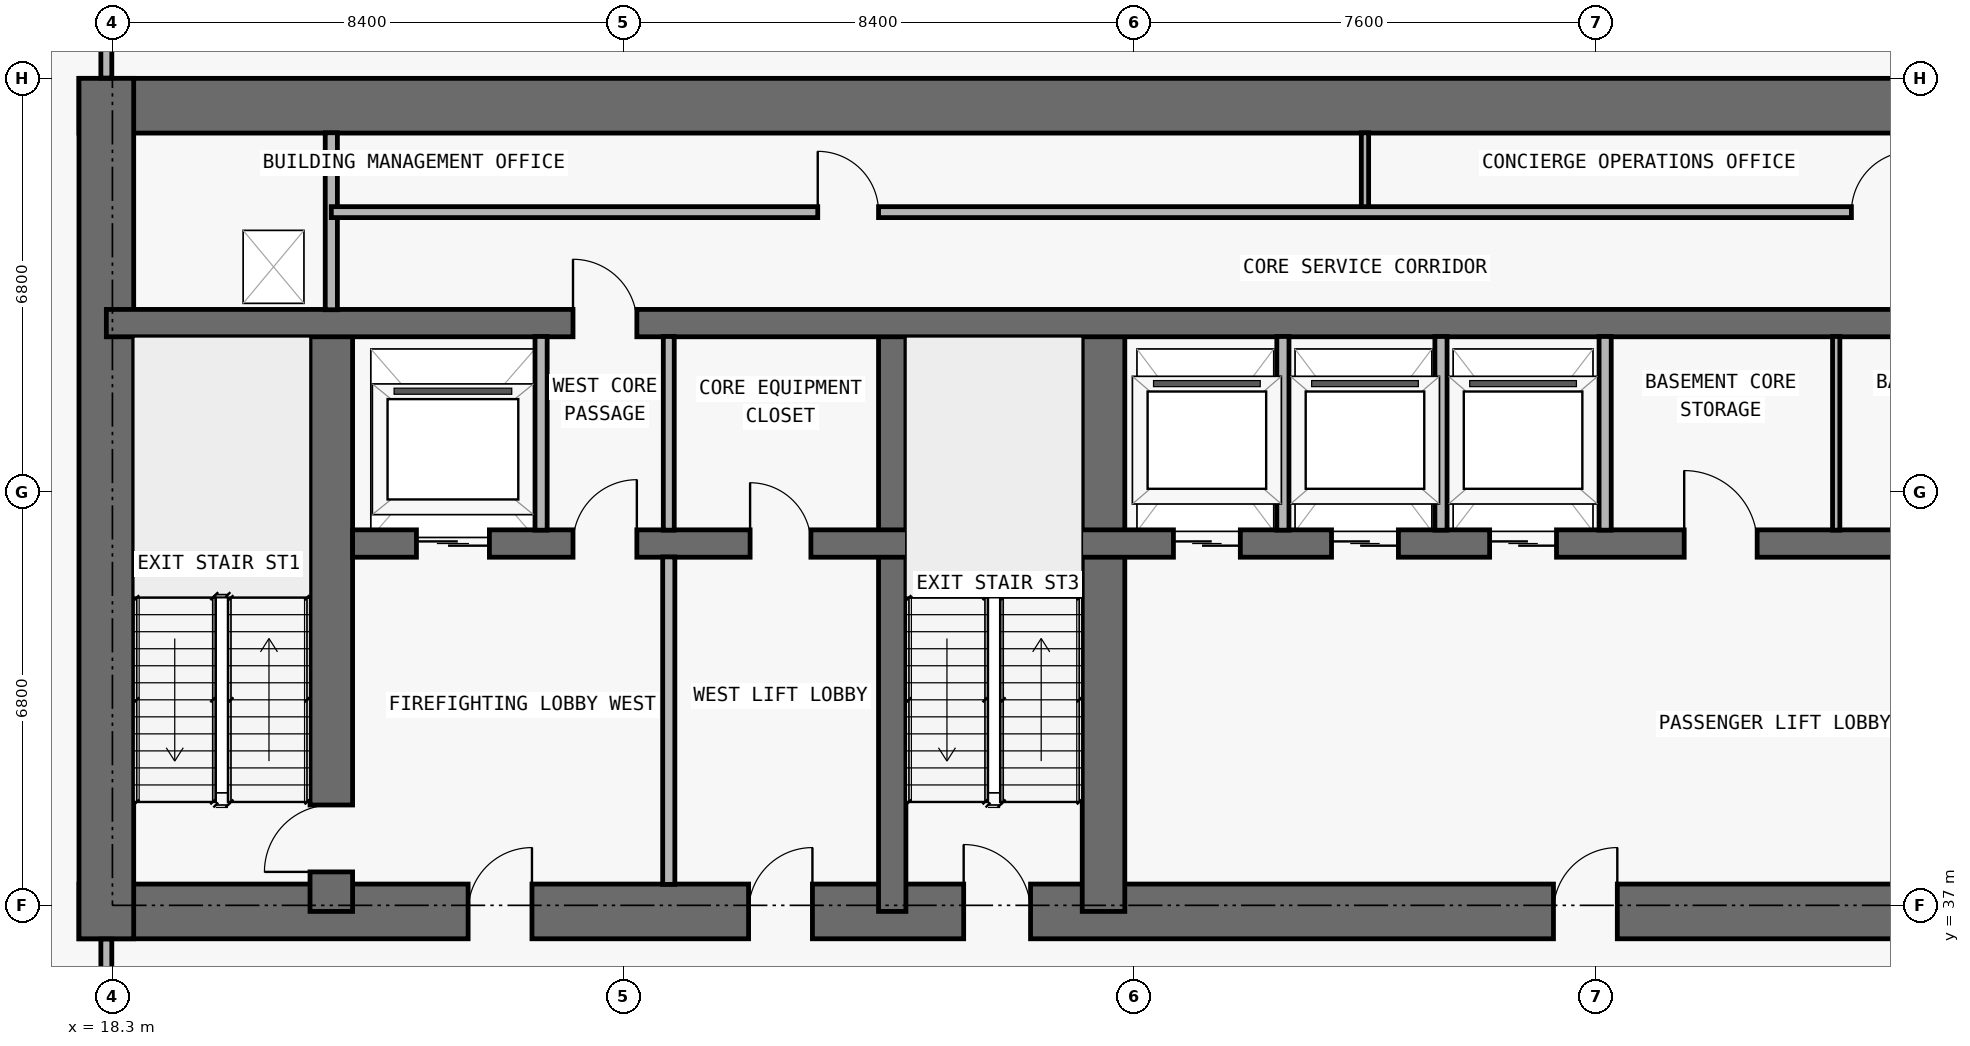
"""IFC4 building model, lengths in metres.
Left out: names, types, materials, properties, quantities, classifications, styles, units other than length and angle.
Written with IfcOpenShell. Run it as: python <this file> out.ifc"""

import sys

from ifc_helpers import new_model, si_unit, direction, frame, frame_2d, origin, place, context, subcontext, project, spatial, rectangle, extrude, element, fill, save


model = new_model("IFC4")
c1 = context("Model", 3, precision=1e-05, world=origin(), true_north=direction((0.0, 1.0)))
c2 = subcontext(c1, "Body", "Model", "MODEL_VIEW")
j1 = project(units=[si_unit("LENGTHUNIT", "METRE"), si_unit("PLANEANGLEUNIT", "RADIAN")], contexts=[c1])
p1 = place(None, origin())
s1 = spatial("IfcSite", under=j1, at=p1, CompositionType="ELEMENT")
p2 = place(p1, origin())
s2 = spatial("IfcBuilding", under=s1, at=p2, CompositionType="ELEMENT")
p3 = place(p2, frame((0.0, 0.0, -4.5)))
s3 = spatial("IfcBuildingStorey", under=s2, at=p3, CompositionType="ELEMENT", Elevation=-4.5)
p4 = place(p3, frame((17.75, 36.9, 0.0), z_axis=(0.0, 0.0, 1.0), x_axis=(1.0, 0.0, 0.0)))
e1 = element("IfcWall", 1, at=p4, inside=s3, PredefinedType="SHEAR", context=c2, shape_type="SweptSolid", body=[
    extrude(rectangle(XDim=42.3, YDim=0.9, at=frame_2d((21.15, 0.0))), origin(), (0.0, 0.0, 1.0), 4.2),
])
p5 = place(p4, frame((14.55, 0.0, 0.0)))
e2 = element("IfcOpeningElement", 2, at=p5, cuts=e1, PredefinedType="OPENING", context=c2, shape_type="SweptSolid", body=[
    extrude(rectangle(XDim=1.1, YDim=2.15, at=frame_2d((0.55, 1.075))), frame((0.0, 0.46, 0.0), z_axis=(0.0, -1.0, 0.0), x_axis=(1.0, 0.0, 0.0)), (0.0, 0.0, 1.0), 0.92),
])
p6 = place(p4, frame((6.4, 0.0, 0.0)))
e3 = element("IfcOpeningElement", 3, at=p6, cuts=e1, PredefinedType="OPENING", context=c2, shape_type="SweptSolid", body=[
    extrude(rectangle(XDim=1.05, YDim=2.15, at=frame_2d((0.525, 1.075))), frame((0.0, 0.46, 0.0), z_axis=(0.0, -1.0, 0.0), x_axis=(1.0, 0.0, 0.0)), (0.0, 0.0, 1.0), 0.92),
])
p7 = place(p4, frame((34.9, 0.0, 0.0)))
e4 = element("IfcOpeningElement", 4, at=p7, cuts=e1, PredefinedType="OPENING", context=c2, shape_type="SweptSolid", body=[
    extrude(rectangle(XDim=1.05, YDim=2.15, at=frame_2d((0.525, 1.075))), frame((0.0, 0.46, 0.0), z_axis=(0.0, -1.0, 0.0), x_axis=(1.0, 0.0, 0.0)), (0.0, 0.0, 1.0), 0.92),
])
p8 = place(p4, frame((11.012, 0.0, 0.0)))
e5 = element("IfcOpeningElement", 5, at=p8, cuts=e1, PredefinedType="OPENING", context=c2, shape_type="SweptSolid", body=[
    extrude(rectangle(XDim=1.05, YDim=2.15, at=frame_2d((0.525, 1.075))), frame((0.0, 0.46, 0.0), z_axis=(0.0, -1.0, 0.0), x_axis=(1.0, 0.0, 0.0)), (0.0, 0.0, 1.0), 0.92),
])
p9 = place(p4, frame((24.25, 0.0, 0.0)))
e6 = element("IfcOpeningElement", 6, at=p9, cuts=e1, PredefinedType="OPENING", context=c2, shape_type="SweptSolid", body=[
    extrude(rectangle(XDim=1.05, YDim=2.15, at=frame_2d((0.525, 1.075))), frame((0.0, 0.46, 0.0), z_axis=(0.0, -1.0, 0.0), x_axis=(1.0, 0.0, 0.0)), (0.0, 0.0, 1.0), 0.92),
])
p10 = place(p3, frame((17.75, 50.15, 0.0), z_axis=(0.0, 0.0, 1.0), x_axis=(1.0, 0.0, 0.0)))
e7 = element("IfcWall", 7, at=p10, inside=s3, PredefinedType="SHEAR", context=c2, shape_type="SweptSolid", body=[
    extrude(rectangle(XDim=42.3, YDim=0.9, at=frame_2d((21.15, 0.0))), origin(), (0.0, 0.0, 1.0), 4.2),
])
p11 = place(p3, frame((18.2, 36.45, 0.0), z_axis=(0.0, 0.0, 1.0), x_axis=(0.0, 1.0, 0.0)))
e8 = element("IfcWall", 8, at=p11, inside=s3, PredefinedType="SHEAR", context=c2, shape_type="SweptSolid", body=[
    extrude(rectangle(XDim=14.15, YDim=0.9, at=frame_2d((7.075, 0.0))), origin(), (0.0, 0.0, 1.0), 4.2),
])
p12 = place(p3, frame((21.9, 36.9, 0.0), z_axis=(0.0, 0.0, 1.0), x_axis=(0.0, 1.0, 0.0)))
e9 = element("IfcWall", 9, at=p12, inside=s3, PredefinedType="SHEAR", context=c2, shape_type="SweptSolid", body=[
    extrude(rectangle(XDim=9.675, YDim=0.7, at=frame_2d((4.837, 0.0))), origin(), (0.0, 0.0, 1.0), 4.2),
])
p13 = place(p12, frame((0.65, 0.0, 0.0)))
e10 = element("IfcOpeningElement", 10, at=p13, cuts=e9, PredefinedType="OPENING", context=c2, shape_type="SweptSolid", body=[
    extrude(rectangle(XDim=1.1, YDim=2.15, at=frame_2d((0.55, 1.075))), frame((0.0, 0.36, 0.0), z_axis=(0.0, -1.0, 0.0), x_axis=(1.0, 0.0, 0.0)), (0.0, 0.0, 1.0), 0.72),
])
p14 = place(p3, frame((31.125, 36.9, 0.0), z_axis=(0.0, 0.0, 1.0), x_axis=(0.0, 1.0, 0.0)))
e11 = element("IfcWall", 11, at=p14, inside=s3, PredefinedType="SHEAR", context=c2, shape_type="SweptSolid", body=[
    extrude(rectangle(XDim=9.675, YDim=0.45, at=frame_2d((4.837, 0.0))), origin(), (0.0, 0.0, 1.0), 4.2),
])
p15 = place(p3, frame((34.6, 36.9, 0.0), z_axis=(0.0, 0.0, 1.0), x_axis=(0.0, 1.0, 0.0)))
e12 = element("IfcWall", 12, at=p15, inside=s3, PredefinedType="SHEAR", context=c2, shape_type="SweptSolid", body=[
    extrude(rectangle(XDim=9.675, YDim=0.7, at=frame_2d((4.837, 0.0))), origin(), (0.0, 0.0, 1.0), 4.2),
])
p16 = place(p3, frame((22.25, 42.95, 0.0), z_axis=(0.0, 0.0, 1.0), x_axis=(1.0, 0.0, 0.0)))
e13 = element("IfcWall", 13, at=p16, inside=s3, PredefinedType="SHEAR", context=c2, shape_type="SweptSolid", body=[
    extrude(rectangle(XDim=33.3, YDim=0.45, at=frame_2d((16.65, 0.0))), origin(), (0.0, 0.0, 1.0), 4.2),
])
p17 = place(p16, frame((1.05, 0.0, 0.0)))
e14 = element("IfcOpeningElement", 14, at=p17, cuts=e13, PredefinedType="OPENING", context=c2, shape_type="SweptSolid", body=[
    extrude(rectangle(XDim=1.2, YDim=2.2, at=frame_2d((0.6, 1.1))), frame((0.0, 0.235, 0.0), z_axis=(0.0, -1.0, 0.0), x_axis=(1.0, 0.0, 0.0)), (0.0, 0.0, 1.0), 0.47),
])
p18 = place(p16, frame((31.05, 0.0, 0.0)))
e15 = element("IfcOpeningElement", 15, at=p18, cuts=e13, PredefinedType="OPENING", context=c2, shape_type="SweptSolid", body=[
    extrude(rectangle(XDim=1.2, YDim=2.2, at=frame_2d((0.6, 1.1))), frame((0.0, 0.235, 0.0), z_axis=(0.0, -1.0, 0.0), x_axis=(1.0, 0.0, 0.0)), (0.0, 0.0, 1.0), 0.47),
])
p19 = place(p16, frame((13.5, 0.0, 0.0)))
e16 = element("IfcOpeningElement", 16, at=p19, cuts=e13, PredefinedType="OPENING", context=c2, shape_type="SweptSolid", body=[
    extrude(rectangle(XDim=1.1, YDim=2.2, at=frame_2d((0.55, 1.1))), frame((0.0, 0.235, 0.0), z_axis=(0.0, -1.0, 0.0), x_axis=(1.0, 0.0, 0.0)), (0.0, 0.0, 1.0), 0.47),
])
p20 = place(p16, frame((16.1, 0.0, 0.0)))
e17 = element("IfcOpeningElement", 17, at=p20, cuts=e13, PredefinedType="OPENING", context=c2, shape_type="SweptSolid", body=[
    extrude(rectangle(XDim=1.1, YDim=2.2, at=frame_2d((0.55, 1.1))), frame((0.0, 0.235, 0.0), z_axis=(0.0, -1.0, 0.0), x_axis=(1.0, 0.0, 0.0)), (0.0, 0.0, 1.0), 0.47),
])
p21 = place(p16, frame((18.7, 0.0, 0.0)))
e18 = element("IfcOpeningElement", 18, at=p21, cuts=e13, PredefinedType="OPENING", context=c2, shape_type="SweptSolid", body=[
    extrude(rectangle(XDim=1.1, YDim=2.2, at=frame_2d((0.55, 1.1))), frame((0.0, 0.235, 0.0), z_axis=(0.0, -1.0, 0.0), x_axis=(1.0, 0.0, 0.0)), (0.0, 0.0, 1.0), 0.47),
])
p22 = place(p16, frame((3.625, 0.0, 0.0)))
e19 = element("IfcOpeningElement", 19, at=p22, cuts=e13, PredefinedType="OPENING", context=c2, shape_type="SweptSolid", body=[
    extrude(rectangle(XDim=1.05, YDim=2.15, at=frame_2d((0.525, 1.075))), frame((0.0, 0.235, 0.0), z_axis=(0.0, -1.0, 0.0), x_axis=(1.0, 0.0, 0.0)), (0.0, 0.0, 1.0), 0.47),
])
p23 = place(p16, frame((28.675, 0.0, 0.0)))
e20 = element("IfcOpeningElement", 20, at=p23, cuts=e13, PredefinedType="OPENING", context=c2, shape_type="SweptSolid", body=[
    extrude(rectangle(XDim=1.05, YDim=2.15, at=frame_2d((0.525, 1.075))), frame((0.0, 0.235, 0.0), z_axis=(0.0, -1.0, 0.0), x_axis=(1.0, 0.0, 0.0)), (0.0, 0.0, 1.0), 0.47),
])
p24 = place(p16, frame((6.538, 0.0, 0.0)))
e21 = element("IfcOpeningElement", 21, at=p24, cuts=e13, PredefinedType="OPENING", context=c2, shape_type="SweptSolid", body=[
    extrude(rectangle(XDim=1.0, YDim=2.2, at=frame_2d((0.5, 1.1))), frame((0.0, 0.235, 0.0), z_axis=(0.0, -1.0, 0.0), x_axis=(1.0, 0.0, 0.0)), (0.0, 0.0, 1.0), 0.47),
])
p25 = place(p16, frame((21.9, 0.0, 0.0)))
e22 = element("IfcOpeningElement", 22, at=p25, cuts=e13, PredefinedType="OPENING", context=c2, shape_type="SweptSolid", body=[
    extrude(rectangle(XDim=1.2, YDim=2.2, at=frame_2d((0.6, 1.1))), frame((0.0, 0.235, 0.0), z_axis=(0.0, -1.0, 0.0), x_axis=(1.0, 0.0, 0.0)), (0.0, 0.0, 1.0), 0.47),
])
p26 = place(p16, frame((25.7, 0.0, 0.0)))
e23 = element("IfcOpeningElement", 23, at=p26, cuts=e13, PredefinedType="OPENING", context=c2, shape_type="SweptSolid", body=[
    extrude(rectangle(XDim=1.2, YDim=2.2, at=frame_2d((0.6, 1.1))), frame((0.0, 0.235, 0.0), z_axis=(0.0, -1.0, 0.0), x_axis=(1.0, 0.0, 0.0)), (0.0, 0.0, 1.0), 0.47),
])
p27 = place(p3, frame((18.2, 46.575, 0.0), z_axis=(0.0, 0.0, 1.0), x_axis=(1.0, 0.0, 0.0)))
e24 = element("IfcWall", 24, at=p27, inside=s3, PredefinedType="SHEAR", context=c2, shape_type="SweptSolid", body=[
    extrude(rectangle(XDim=41.4, YDim=0.45, at=frame_2d((20.7, 0.0))), origin(), (0.0, 0.0, 1.0), 4.2),
])
p28 = place(p27, frame((7.675, 0.0, 0.0)))
e25 = element("IfcOpeningElement", 25, at=p28, cuts=e24, PredefinedType="OPENING", context=c2, shape_type="SweptSolid", body=[
    extrude(rectangle(XDim=1.05, YDim=2.15, at=frame_2d((0.525, 1.075))), frame((0.0, 0.235, 0.0), z_axis=(0.0, -1.0, 0.0), x_axis=(1.0, 0.0, 0.0)), (0.0, 0.0, 1.0), 0.47),
])
p29 = place(p27, frame((32.725, 0.0, 0.0)))
e26 = element("IfcOpeningElement", 26, at=p29, cuts=e24, PredefinedType="OPENING", context=c2, shape_type="SweptSolid", body=[
    extrude(rectangle(XDim=1.05, YDim=2.15, at=frame_2d((0.525, 1.075))), frame((0.0, 0.235, 0.0), z_axis=(0.0, -1.0, 0.0), x_axis=(1.0, 0.0, 0.0)), (0.0, 0.0, 1.0), 0.47),
])
p30 = place(p3, frame((18.2, 34.4, 0.0), z_axis=(0.0, 0.0, 1.0), x_axis=(0.0, 1.0, 0.0)))
e27 = element("IfcWall", 27, at=p30, inside=s3, PredefinedType="PARTITIONING", context=c2, shape_type="SweptSolid", body=[
    extrude(rectangle(XDim=2.045, YDim=0.18, at=frame_2d((1.022, 0.0))), origin(), (0.0, 0.0, 1.0), 3.085),
])
p31 = place(p3, frame((18.2, 50.605, 0.0), z_axis=(0.0, 0.0, 1.0), x_axis=(0.0, 1.0, 0.0)))
e28 = element("IfcWall", 28, at=p31, inside=s3, PredefinedType="PARTITIONING", context=c2, shape_type="SweptSolid", body=[
    extrude(rectangle(XDim=2.695, YDim=0.18, at=frame_2d((1.348, 0.0))), origin(), (0.0, 0.0, 1.0), 4.2),
])
p32 = place(p3, frame((21.9, 46.795, 0.0), z_axis=(0.0, 0.0, 1.0), x_axis=(0.0, 1.0, 0.0)))
e29 = element("IfcWall", 29, at=p32, inside=s3, PredefinedType="PARTITIONING", context=c2, shape_type="SweptSolid", body=[
    extrude(rectangle(XDim=2.91, YDim=0.2, at=frame_2d((1.455, 0.0))), origin(), (0.0, 0.0, 1.0), 4.2),
])
p33 = place(p3, frame((25.35, 43.17, 0.0), z_axis=(0.0, 0.0, 1.0), x_axis=(0.0, 1.0, 0.0)))
e30 = element("IfcWall", 30, at=p33, inside=s3, PredefinedType="PARTITIONING", context=c2, shape_type="SweptSolid", body=[
    extrude(rectangle(XDim=3.185, YDim=0.2, at=frame_2d((1.593, 0.0))), origin(), (0.0, 0.0, 1.0), 4.2),
])
p34 = place(p3, frame((27.45, 37.345, 0.0), z_axis=(0.0, 0.0, 1.0), x_axis=(0.0, 1.0, 0.0)))
e31 = element("IfcWall", 31, at=p34, inside=s3, PredefinedType="PARTITIONING", context=c2, shape_type="SweptSolid", body=[
    extrude(rectangle(XDim=5.385, YDim=0.2, at=frame_2d((2.692, 0.0))), origin(), (0.0, 0.0, 1.0), 4.2),
])
p35 = place(p3, frame((27.45, 43.17, 0.0), z_axis=(0.0, 0.0, 1.0), x_axis=(0.0, 1.0, 0.0)))
e32 = element("IfcWall", 32, at=p35, inside=s3, PredefinedType="PARTITIONING", context=c2, shape_type="SweptSolid", body=[
    extrude(rectangle(XDim=3.185, YDim=0.18, at=frame_2d((1.593, 0.0))), origin(), (0.0, 0.0, 1.0), 4.2),
])
p36 = place(p3, frame((37.55, 43.17, 0.0), z_axis=(0.0, 0.0, 1.0), x_axis=(0.0, 1.0, 0.0)))
e33 = element("IfcWall", 33, at=p36, inside=s3, PredefinedType="PARTITIONING", context=c2, shape_type="SweptSolid", body=[
    extrude(rectangle(XDim=3.185, YDim=0.2, at=frame_2d((1.593, 0.0))), origin(), (0.0, 0.0, 1.0), 4.2),
])
p37 = place(p3, frame((38.9, 48.4, 0.0), z_axis=(0.0, 0.0, 1.0), x_axis=(0.0, 1.0, 0.0)))
e34 = element("IfcWall", 34, at=p37, inside=s3, PredefinedType="PARTITIONING", context=c2, shape_type="SweptSolid", body=[
    extrude(rectangle(XDim=1.305, YDim=0.12, at=frame_2d((0.653, 0.0))), origin(), (0.0, 0.0, 1.0), 4.2),
])
for number, where, z_axis, x_axis in (
    (35, (40.15, 43.17, 0.0), (0.0, 0.0, 1.0), (0.0, 1.0, 0.0)),
    (36, (42.85, 43.17, 0.0), (0.0, 0.0, 1.0), (0.0, 1.0, 0.0)),
):
    element("IfcWall", number, at=place(p3, frame(where, z_axis=z_axis, x_axis=x_axis)), inside=s3, PredefinedType="PARTITIONING", context=c2, shape_type="SweptSolid", body=[
        extrude(rectangle(XDim=3.185, YDim=0.2, at=frame_2d((1.593, 0.0))), origin(), (0.0, 0.0, 1.0), 4.2),
    ])
p38 = place(p3, frame((46.65, 43.17, 0.0), z_axis=(0.0, 0.0, 1.0), x_axis=(0.0, 1.0, 0.0)))
e37 = element("IfcWall", 37, at=p38, inside=s3, PredefinedType="PARTITIONING", context=c2, shape_type="SweptSolid", body=[
    extrude(rectangle(XDim=3.185, YDim=0.12, at=frame_2d((1.593, 0.0))), origin(), (0.0, 0.0, 1.0), 4.2),
])
p39 = place(p3, frame((21.9, 48.4, 0.0), z_axis=(0.0, 0.0, 1.0), x_axis=(1.0, 0.0, 0.0)))
e38 = element("IfcWall", 38, at=p39, inside=s3, PredefinedType="PARTITIONING", context=c2, shape_type="SweptSolid", body=[
    extrude(rectangle(XDim=34.0, YDim=0.18, at=frame_2d((17.0, 0.0))), origin(), (0.0, 0.0, 1.0), 4.2),
])
p40 = place(p39, frame((8.0, 0.0, 0.0)))
e39 = element("IfcOpeningElement", 39, at=p40, cuts=e38, PredefinedType="OPENING", context=c2, shape_type="SweptSolid", body=[
    extrude(rectangle(XDim=1.0, YDim=2.2, at=frame_2d((0.5, 1.1))), frame((0.0, 0.1, 0.0), z_axis=(0.0, -1.0, 0.0), x_axis=(1.0, 0.0, 0.0)), (0.0, 0.0, 1.0), 0.2),
])
p41 = place(p39, frame((25.0, 0.0, 0.0)))
e40 = element("IfcOpeningElement", 40, at=p41, cuts=e38, PredefinedType="OPENING", context=c2, shape_type="SweptSolid", body=[
    extrude(rectangle(XDim=1.0, YDim=2.2, at=frame_2d((0.5, 1.1))), frame((0.0, 0.1, 0.0), z_axis=(0.0, -1.0, 0.0), x_axis=(1.0, 0.0, 0.0)), (0.0, 0.0, 1.0), 0.2),
])
p42 = place(p17, origin())
e41 = element("IfcDoor", 41, at=p42, inside=s3, OperationType="DOUBLE_DOOR_SLIDING", PredefinedType="DOOR", context=c2, shape_type="SweptSolid", body=[
    extrude(rectangle(XDim=1.2, YDim=2.2, at=frame_2d((0.6, 1.1))), frame((0.0, 0.025, 0.0), z_axis=(0.0, -1.0, 0.0), x_axis=(1.0, 0.0, 0.0)), (0.0, 0.0, 1.0), 0.05),
])
fill(e14, e41)
p43 = place(p19, origin())
e42 = element("IfcDoor", 42, at=p43, inside=s3, OperationType="DOUBLE_DOOR_SLIDING", PredefinedType="DOOR", context=c2, shape_type="SweptSolid", body=[
    extrude(rectangle(XDim=1.1, YDim=2.2, at=frame_2d((0.55, 1.1))), frame((0.0, 0.025, 0.0), z_axis=(0.0, -1.0, 0.0), x_axis=(1.0, 0.0, 0.0)), (0.0, 0.0, 1.0), 0.05),
])
fill(e16, e42)
p44 = place(p20, origin())
e43 = element("IfcDoor", 43, at=p44, inside=s3, OperationType="DOUBLE_DOOR_SLIDING", PredefinedType="DOOR", context=c2, shape_type="SweptSolid", body=[
    extrude(rectangle(XDim=1.1, YDim=2.2, at=frame_2d((0.55, 1.1))), frame((0.0, 0.025, 0.0), z_axis=(0.0, -1.0, 0.0), x_axis=(1.0, 0.0, 0.0)), (0.0, 0.0, 1.0), 0.05),
])
fill(e17, e43)
p45 = place(p21, origin())
e44 = element("IfcDoor", 44, at=p45, inside=s3, OperationType="DOUBLE_DOOR_SLIDING", PredefinedType="DOOR", context=c2, shape_type="SweptSolid", body=[
    extrude(rectangle(XDim=1.1, YDim=2.2, at=frame_2d((0.55, 1.1))), frame((0.0, 0.025, 0.0), z_axis=(0.0, -1.0, 0.0), x_axis=(1.0, 0.0, 0.0)), (0.0, 0.0, 1.0), 0.05),
])
fill(e18, e44)
p46 = place(p5, origin())
e45 = element("IfcDoor", 45, at=p46, inside=s3, OperationType="SINGLE_SWING_LEFT", PredefinedType="DOOR", context=c2, shape_type="SweptSolid", body=[
    extrude(rectangle(XDim=1.1, YDim=2.15, at=frame_2d((0.55, 1.075))), frame((0.0, 0.025, 0.0), z_axis=(0.0, -1.0, 0.0), x_axis=(1.0, 0.0, 0.0)), (0.0, 0.0, 1.0), 0.05),
])
fill(e2, e45)
p47 = place(p6, origin())
e46 = element("IfcDoor", 46, at=p47, inside=s3, OperationType="SINGLE_SWING_RIGHT", PredefinedType="DOOR", context=c2, shape_type="SweptSolid", body=[
    extrude(rectangle(XDim=1.05, YDim=2.15, at=frame_2d((0.525, 1.075))), frame((0.0, 0.025, 0.0), z_axis=(0.0, -1.0, 0.0), x_axis=(1.0, 0.0, 0.0)), (0.0, 0.0, 1.0), 0.05),
])
fill(e3, e46)
p48 = place(p13, origin())
e47 = element("IfcDoor", 47, at=p48, inside=s3, OperationType="SINGLE_SWING_LEFT", PredefinedType="DOOR", context=c2, shape_type="SweptSolid", body=[
    extrude(rectangle(XDim=1.1, YDim=2.15, at=frame_2d((0.55, 1.075))), frame((0.0, 0.025, 0.0), z_axis=(0.0, -1.0, 0.0), x_axis=(1.0, 0.0, 0.0)), (0.0, 0.0, 1.0), 0.05),
])
fill(e10, e47)
p49 = place(p22, origin())
e48 = element("IfcDoor", 48, at=p49, inside=s3, OperationType="SINGLE_SWING_RIGHT", PredefinedType="DOOR", context=c2, shape_type="SweptSolid", body=[
    extrude(rectangle(XDim=1.05, YDim=2.15, at=frame_2d((0.525, 1.075))), frame((0.0, 0.025, 0.0), z_axis=(0.0, -1.0, 0.0), x_axis=(1.0, 0.0, 0.0)), (0.0, 0.0, 1.0), 0.05),
])
fill(e19, e48)
p50 = place(p8, origin())
e49 = element("IfcDoor", 49, at=p50, inside=s3, OperationType="SINGLE_SWING_RIGHT", PredefinedType="DOOR", context=c2, shape_type="SweptSolid", body=[
    extrude(rectangle(XDim=1.05, YDim=2.15, at=frame_2d((0.525, 1.075))), frame((0.0, 0.025, 0.0), z_axis=(0.0, -1.0, 0.0), x_axis=(1.0, 0.0, 0.0)), (0.0, 0.0, 1.0), 0.05),
])
fill(e5, e49)
p51 = place(p24, origin())
e50 = element("IfcDoor", 50, at=p51, inside=s3, OperationType="SINGLE_SWING_LEFT", PredefinedType="DOOR", context=c2, shape_type="SweptSolid", body=[
    extrude(rectangle(XDim=1.0, YDim=2.2, at=frame_2d((0.5, 1.1))), frame((0.0, 0.025, 0.0), z_axis=(0.0, -1.0, 0.0), x_axis=(1.0, 0.0, 0.0)), (0.0, 0.0, 1.0), 0.05),
])
fill(e21, e50)
p52 = place(p9, origin())
e51 = element("IfcDoor", 51, at=p52, inside=s3, OperationType="SINGLE_SWING_RIGHT", PredefinedType="DOOR", context=c2, shape_type="SweptSolid", body=[
    extrude(rectangle(XDim=1.05, YDim=2.15, at=frame_2d((0.525, 1.075))), frame((0.0, 0.025, 0.0), z_axis=(0.0, -1.0, 0.0), x_axis=(1.0, 0.0, 0.0)), (0.0, 0.0, 1.0), 0.05),
])
fill(e6, e51)
p53 = place(p25, origin())
e52 = element("IfcDoor", 52, at=p53, inside=s3, OperationType="SINGLE_SWING_LEFT", PredefinedType="DOOR", context=c2, shape_type="SweptSolid", body=[
    extrude(rectangle(XDim=1.2, YDim=2.2, at=frame_2d((0.6, 1.1))), frame((0.0, 0.025, 0.0), z_axis=(0.0, -1.0, 0.0), x_axis=(1.0, 0.0, 0.0)), (0.0, 0.0, 1.0), 0.05),
])
fill(e22, e52)
p54 = place(p28, origin())
e53 = element("IfcDoor", 53, at=p54, inside=s3, OperationType="SINGLE_SWING_LEFT", PredefinedType="DOOR", context=c2, shape_type="SweptSolid", body=[
    extrude(rectangle(XDim=1.05, YDim=2.15, at=frame_2d((0.525, 1.075))), frame((0.0, 0.025, 0.0), z_axis=(0.0, -1.0, 0.0), x_axis=(1.0, 0.0, 0.0)), (0.0, 0.0, 1.0), 0.05),
])
fill(e25, e53)
p55 = place(p40, origin())
e54 = element("IfcDoor", 54, at=p55, inside=s3, OperationType="SINGLE_SWING_LEFT", PredefinedType="DOOR", context=c2, shape_type="SweptSolid", body=[
    extrude(rectangle(XDim=1.0, YDim=2.2, at=frame_2d((0.5, 1.1))), frame((0.0, 0.025, 0.0), z_axis=(0.0, -1.0, 0.0), x_axis=(1.0, 0.0, 0.0)), (0.0, 0.0, 1.0), 0.05),
])
fill(e39, e54)
p56 = place(p41, origin())
e55 = element("IfcDoor", 55, at=p56, inside=s3, OperationType="SINGLE_SWING_RIGHT", PredefinedType="DOOR", context=c2, shape_type="SweptSolid", body=[
    extrude(rectangle(XDim=1.0, YDim=2.2, at=frame_2d((0.5, 1.1))), frame((0.0, 0.025, 0.0), z_axis=(0.0, -1.0, 0.0), x_axis=(1.0, 0.0, 0.0)), (0.0, 0.0, 1.0), 0.05),
])
fill(e40, e55)
save(model, sys.argv[1])
